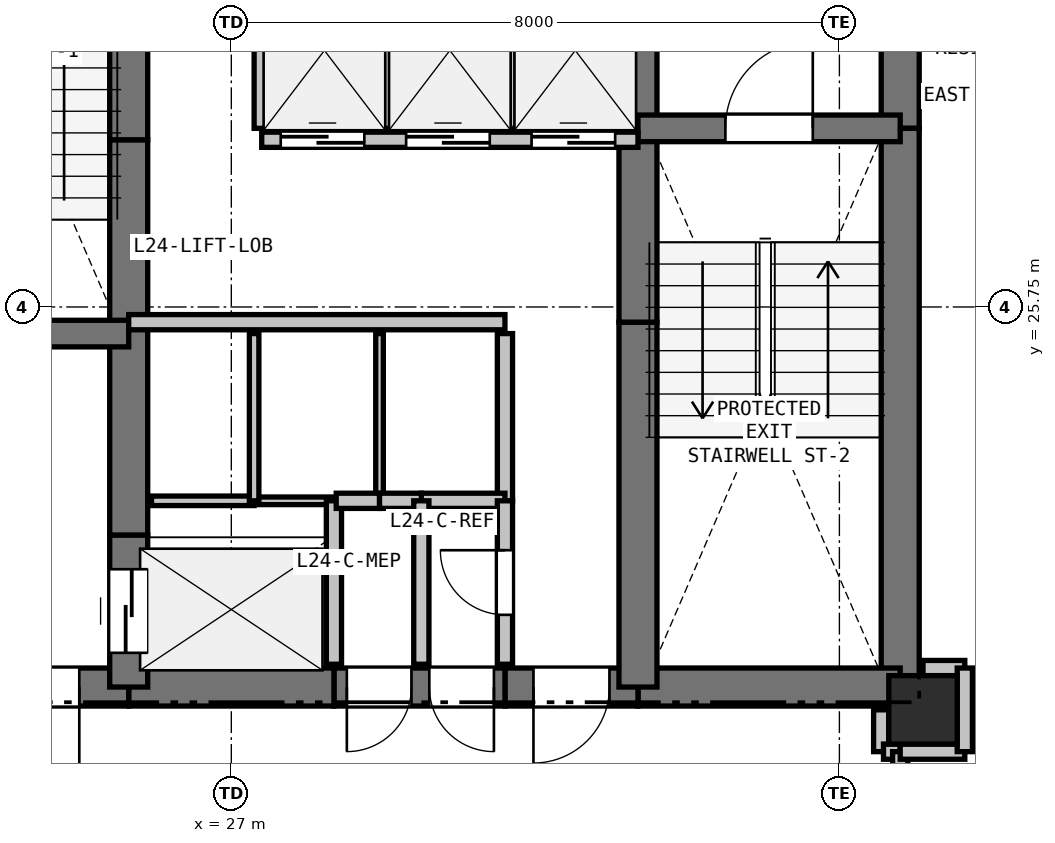
"""IFC4 building model, lengths in metres.
Left out: names, types, materials, properties, quantities, classifications, styles, units other than length and angle.
Written with IfcOpenShell. Run it as: python <this file> out.ifc"""

import sys

from ifc_helpers import new_model, si_unit, direction, frame, frame_2d, origin, origin_2d, place, context, subcontext, project, spatial, rectangle, extrude, element, fill, save


model = new_model("IFC4")
c1 = context("Model", 3, precision=1e-05, world=origin(), true_north=direction((0.0, 1.0)))
c2 = subcontext(c1, "Body", "Model", "MODEL_VIEW")
j1 = project(units=[si_unit("LENGTHUNIT", "METRE"), si_unit("PLANEANGLEUNIT", "RADIAN")], contexts=[c1])
p1 = place(None, origin())
s1 = spatial("IfcSite", under=j1, at=p1, CompositionType="ELEMENT")
p2 = place(p1, origin())
s2 = spatial("IfcBuilding", under=s1, at=p2, CompositionType="ELEMENT")
p3 = place(p2, frame((0.0, 0.0, 90.0)))
s3 = spatial("IfcBuildingStorey", under=s2, at=p3, CompositionType="ELEMENT", Elevation=90.0)
p4 = place(p3, frame((36.1, 20.45, 0.0), z_axis=(0.0, 0.0, 1.0), x_axis=(1.0, 0.0, 0.0)))
e1 = element("IfcColumn", 1, at=p4, inside=s3, PredefinedType="COLUMN", context=c2, shape_type="SweptSolid", body=[
    extrude(rectangle(XDim=0.9, YDim=0.9, at=origin_2d()), origin(), (0.0, 0.0, 1.0), 3.3),
])
p5 = place(p3, frame((35.8, 32.75, 0.0), z_axis=(0.0, 0.0, 1.0), x_axis=(0.0, -1.0, 0.0)))
e2 = element("IfcWall", 2, at=p5, inside=s3, PredefinedType="SHEAR", context=c2, shape_type="SweptSolid", body=[
    extrude(rectangle(XDim=4.65, YDim=0.5, at=frame_2d((2.325, 0.0))), origin(), (0.0, 0.0, 1.0), 3.05),
])
p6 = place(p3, frame((35.8, 28.1, 0.0), z_axis=(0.0, 0.0, 1.0), x_axis=(0.0, -1.0, 0.0)))
e3 = element("IfcWall", 3, at=p6, inside=s3, PredefinedType="SHEAR", context=c2, shape_type="SweptSolid", body=[
    extrude(rectangle(XDim=7.35, YDim=0.5, at=frame_2d((3.675, 0.0))), origin(), (0.0, 0.0, 1.0), 3.05),
])
p7 = place(p3, frame((35.8, 20.75, 0.0), z_axis=(0.0, 0.0, 1.0), x_axis=(-1.0, 0.0, 0.0)))
e4 = element("IfcWall", 4, at=p7, inside=s3, PredefinedType="SHEAR", context=c2, shape_type="SweptSolid", body=[
    extrude(rectangle(XDim=3.45, YDim=0.5, at=frame_2d((1.725, 0.0))), origin(), (0.0, 0.0, 1.0), 3.05),
])
p8 = place(p3, frame((32.35, 20.75, 0.0), z_axis=(0.0, 0.0, 1.0), x_axis=(-1.0, 0.0, 0.0)))
e5 = element("IfcWall", 5, at=p8, inside=s3, PredefinedType="SHEAR", context=c2, shape_type="SweptSolid", body=[
    extrude(rectangle(XDim=1.75, YDim=0.5, at=frame_2d((0.875, 0.0))), origin(), (0.0, 0.0, 1.0), 3.05),
])
p9 = place(p8, frame((0.375, 0.0, 0.0)))
e6 = element("IfcOpeningElement", 6, at=p9, cuts=e5, PredefinedType="OPENING", context=c2, shape_type="SweptSolid", body=[
    extrude(rectangle(XDim=1.0, YDim=2.15, at=frame_2d((0.5, 1.075))), frame((0.0, 0.26, 0.0), z_axis=(0.0, -1.0, 0.0), x_axis=(1.0, 0.0, 0.0)), (0.0, 0.0, 1.0), 0.52),
])
p10 = place(p3, frame((30.6, 20.75, 0.0), z_axis=(0.0, 0.0, 1.0), x_axis=(-1.0, 0.0, 0.0)))
e7 = element("IfcWall", 7, at=p10, inside=s3, PredefinedType="SHEAR", context=c2, shape_type="SweptSolid", body=[
    extrude(rectangle(XDim=2.25, YDim=0.5, at=frame_2d((1.125, 0.0))), origin(), (0.0, 0.0, 1.0), 3.05),
])
p11 = place(p10, frame((1.23, 0.0, 0.0)))
e8 = element("IfcOpeningElement", 8, at=p11, cuts=e7, PredefinedType="OPENING", context=c2, shape_type="SweptSolid", body=[
    extrude(rectangle(XDim=0.85, YDim=2.1, at=frame_2d((0.425, 1.05))), frame((0.0, 0.26, 0.0), z_axis=(0.0, -1.0, 0.0), x_axis=(1.0, 0.0, 0.0)), (0.0, 0.0, 1.0), 0.52),
])
p12 = place(p10, frame((0.145, 0.0, 0.0)))
e9 = element("IfcOpeningElement", 9, at=p12, cuts=e7, PredefinedType="OPENING", context=c2, shape_type="SweptSolid", body=[
    extrude(rectangle(XDim=0.85, YDim=2.1, at=frame_2d((0.425, 1.05))), frame((0.0, 0.26, 0.0), z_axis=(0.0, -1.0, 0.0), x_axis=(1.0, 0.0, 0.0)), (0.0, 0.0, 1.0), 0.52),
])
p13 = place(p3, frame((28.35, 20.75, 0.0), z_axis=(0.0, 0.0, 1.0), x_axis=(-1.0, 0.0, 0.0)))
e10 = element("IfcWall", 10, at=p13, inside=s3, PredefinedType="SHEAR", context=c2, shape_type="SweptSolid", body=[
    extrude(rectangle(XDim=2.7, YDim=0.5, at=frame_2d((1.35, 0.0))), origin(), (0.0, 0.0, 1.0), 3.05),
])
p14 = place(p3, frame((25.65, 20.75, 0.0), z_axis=(0.0, 0.0, 1.0), x_axis=(-1.0, 0.0, 0.0)))
e11 = element("IfcWall", 11, at=p14, inside=s3, PredefinedType="SHEAR", context=c2, shape_type="SweptSolid", body=[
    extrude(rectangle(XDim=3.45, YDim=0.5, at=frame_2d((1.725, 0.0))), origin(), (0.0, 0.0, 1.0), 3.05),
])
p15 = place(p14, frame((0.65, 0.0, 0.0)))
e12 = element("IfcOpeningElement", 12, at=p15, cuts=e11, PredefinedType="OPENING", context=c2, shape_type="SweptSolid", body=[
    extrude(rectangle(XDim=1.15, YDim=2.15, at=frame_2d((0.575, 1.075))), frame((0.0, 0.26, 0.0), z_axis=(0.0, -1.0, 0.0), x_axis=(1.0, 0.0, 0.0)), (0.0, 0.0, 1.0), 0.52),
])
p16 = place(p3, frame((25.65, 20.75, 0.0), z_axis=(0.0, 0.0, 1.0), x_axis=(0.0, 1.0, 0.0)))
e13 = element("IfcWall", 13, at=p16, inside=s3, PredefinedType="SHEAR", context=c2, shape_type="SweptSolid", body=[
    extrude(rectangle(XDim=2.0, YDim=0.5, at=frame_2d((1.0, 0.0))), origin(), (0.0, 0.0, 1.0), 3.05),
])
p17 = place(p16, frame((0.45, 0.0, 0.0)))
e14 = element("IfcOpeningElement", 14, at=p17, cuts=e13, PredefinedType="OPENING", context=c2, shape_type="SweptSolid", body=[
    extrude(rectangle(XDim=1.1, YDim=2.15, at=frame_2d((0.55, 1.075))), frame((0.0, 0.26, 0.0), z_axis=(0.0, -1.0, 0.0), x_axis=(1.0, 0.0, 0.0)), (0.0, 0.0, 1.0), 0.52),
])
p18 = place(p3, frame((25.65, 22.75, 0.0), z_axis=(0.0, 0.0, 1.0), x_axis=(0.0, 1.0, 0.0)))
e15 = element("IfcWall", 15, at=p18, inside=s3, PredefinedType="SHEAR", context=c2, shape_type="SweptSolid", body=[
    extrude(rectangle(XDim=2.8, YDim=0.5, at=frame_2d((1.4, 0.0))), origin(), (0.0, 0.0, 1.0), 3.05),
])
p19 = place(p3, frame((25.65, 25.55, 0.0), z_axis=(0.0, 0.0, 1.0), x_axis=(0.0, 1.0, 0.0)))
e16 = element("IfcWall", 16, at=p19, inside=s3, PredefinedType="SHEAR", context=c2, shape_type="SweptSolid", body=[
    extrude(rectangle(XDim=2.4, YDim=0.5, at=frame_2d((1.2, 0.0))), origin(), (0.0, 0.0, 1.0), 3.05),
])
for number, where, z_axis, x_axis in (
    (17, (25.65, 27.95, 0.0), (0.0, 0.0, 1.0), (0.0, 1.0, 0.0)),
    (18, (32.35, 20.75, 0.0), (0.0, 0.0, 1.0), (0.0, 1.0, 0.0)),
):
    element("IfcWall", number, at=place(p3, frame(where, z_axis=z_axis, x_axis=x_axis)), inside=s3, PredefinedType="SHEAR", context=c2, shape_type="SweptSolid", body=[
        extrude(rectangle(XDim=4.8, YDim=0.5, at=frame_2d((2.4, 0.0))), origin(), (0.0, 0.0, 1.0), 3.05),
    ])
p20 = place(p3, frame((32.35, 25.55, 0.0), z_axis=(0.0, 0.0, 1.0), x_axis=(0.0, 1.0, 0.0)))
e19 = element("IfcWall", 19, at=p20, inside=s3, PredefinedType="SHEAR", context=c2, shape_type="SweptSolid", body=[
    extrude(rectangle(XDim=2.4, YDim=0.5, at=frame_2d((1.2, 0.0))), origin(), (0.0, 0.0, 1.0), 3.05),
])
p21 = place(p3, frame((32.35, 27.95, 0.0), z_axis=(0.0, 0.0, 1.0), x_axis=(0.0, 1.0, 0.0)))
e20 = element("IfcWall", 20, at=p21, inside=s3, PredefinedType="SHEAR", context=c2, shape_type="SweptSolid", body=[
    extrude(rectangle(XDim=2.8, YDim=0.5, at=frame_2d((1.4, 0.0))), origin(), (0.0, 0.0, 1.0), 3.05),
])
p22 = place(p3, frame((22.2, 25.4, 0.0), z_axis=(0.0, 0.0, 1.0), x_axis=(1.0, 0.0, 0.0)))
e21 = element("IfcWall", 21, at=p22, inside=s3, PredefinedType="SHEAR", context=c2, shape_type="SweptSolid", body=[
    extrude(rectangle(XDim=3.45, YDim=0.35, at=frame_2d((1.725, 0.0))), origin(), (0.0, 0.0, 1.0), 3.05),
])
p23 = place(p22, frame((1.15, 0.0, 0.0)))
e22 = element("IfcOpeningElement", 22, at=p23, cuts=e21, PredefinedType="OPENING", context=c2, shape_type="SweptSolid", body=[
    extrude(rectangle(XDim=1.15, YDim=2.15, at=frame_2d((0.575, 1.075))), frame((0.0, 0.185, 0.0), z_axis=(0.0, -1.0, 0.0), x_axis=(1.0, 0.0, 0.0)), (0.0, 0.0, 1.0), 0.37),
])
p24 = place(p3, frame((32.35, 28.1, 0.0), z_axis=(0.0, 0.0, 1.0), x_axis=(1.0, 0.0, 0.0)))
e23 = element("IfcWall", 23, at=p24, inside=s3, PredefinedType="SHEAR", context=c2, shape_type="SweptSolid", body=[
    extrude(rectangle(XDim=3.45, YDim=0.35, at=frame_2d((1.725, 0.0))), origin(), (0.0, 0.0, 1.0), 3.05),
])
p25 = place(p24, frame((1.15, 0.0, 0.0)))
e24 = element("IfcOpeningElement", 24, at=p25, cuts=e23, PredefinedType="OPENING", context=c2, shape_type="SweptSolid", body=[
    extrude(rectangle(XDim=1.15, YDim=2.15, at=frame_2d((0.575, 1.075))), frame((0.0, 0.185, 0.0), z_axis=(0.0, -1.0, 0.0), x_axis=(1.0, 0.0, 0.0)), (0.0, 0.0, 1.0), 0.37),
])
p26 = place(p3, frame((25.65, 25.55, 0.0), z_axis=(0.0, 0.0, 1.0), x_axis=(1.0, 0.0, 0.0)))
e25 = element("IfcWall", 25, at=p26, inside=s3, PredefinedType="PARTITIONING", context=c2, shape_type="SweptSolid", body=[
    extrude(rectangle(XDim=4.95, YDim=0.2, at=frame_2d((2.475, 0.0))), origin(), (0.0, 0.0, 1.0), 3.05),
])
p27 = place(p3, frame((27.4, 27.95, 0.0), z_axis=(0.0, 0.0, 1.0), x_axis=(1.0, 0.0, 0.0)))
e26 = element("IfcWall", 26, at=p27, inside=s3, PredefinedType="PARTITIONING", context=c2, shape_type="SweptSolid", body=[
    extrude(rectangle(XDim=4.95, YDim=0.2, at=frame_2d((2.475, 0.0))), origin(), (0.0, 0.0, 1.0), 3.05),
])
p28 = place(p27, frame((0.25, 0.0, 0.0)))
e27 = element("IfcOpeningElement", 27, at=p28, cuts=e26, PredefinedType="OPENING", context=c2, shape_type="SweptSolid", body=[
    extrude(rectangle(XDim=1.1, YDim=2.15, at=frame_2d((0.55, 1.075))), frame((0.0, 0.11, 0.0), z_axis=(0.0, -1.0, 0.0), x_axis=(1.0, 0.0, 0.0)), (0.0, 0.0, 1.0), 0.22),
])
p29 = place(p27, frame((1.9, 0.0, 0.0)))
e28 = element("IfcOpeningElement", 28, at=p29, cuts=e26, PredefinedType="OPENING", context=c2, shape_type="SweptSolid", body=[
    extrude(rectangle(XDim=1.1, YDim=2.15, at=frame_2d((0.55, 1.075))), frame((0.0, 0.11, 0.0), z_axis=(0.0, -1.0, 0.0), x_axis=(1.0, 0.0, 0.0)), (0.0, 0.0, 1.0), 0.22),
])
p30 = place(p27, frame((3.55, 0.0, 0.0)))
e29 = element("IfcOpeningElement", 29, at=p30, cuts=e26, PredefinedType="OPENING", context=c2, shape_type="SweptSolid", body=[
    extrude(rectangle(XDim=1.1, YDim=2.15, at=frame_2d((0.55, 1.075))), frame((0.0, 0.11, 0.0), z_axis=(0.0, -1.0, 0.0), x_axis=(1.0, 0.0, 0.0)), (0.0, 0.0, 1.0), 0.22),
])
p31 = place(p3, frame((25.95, 23.2, 0.0), z_axis=(0.0, 0.0, 1.0), x_axis=(1.0, 0.0, 0.0)))
e30 = element("IfcWall", 30, at=p31, inside=s3, PredefinedType="PARTITIONING", context=c2, shape_type="SweptSolid", body=[
    extrude(rectangle(XDim=1.35, YDim=0.125, at=frame_2d((0.675, 0.0))), origin(), (0.0, 0.0, 1.0), 3.05),
])
p32 = place(p3, frame((27.3, 23.2, 0.0), z_axis=(0.0, 0.0, 1.0), x_axis=(1.0, 0.0, 0.0)))
e31 = element("IfcWall", 31, at=p32, inside=s3, PredefinedType="PARTITIONING", context=c2, shape_type="SweptSolid", body=[
    extrude(rectangle(XDim=1.05, YDim=0.1, at=frame_2d((0.525, 0.0))), origin(), (0.0, 0.0, 1.0), 3.05),
])
p33 = place(p3, frame((28.35, 23.2, 0.0), z_axis=(0.0, 0.0, 1.0), x_axis=(0.0, -1.0, 0.0)))
e32 = element("IfcWall", 32, at=p33, inside=s3, PredefinedType="PARTITIONING", context=c2, shape_type="SweptSolid", body=[
    extrude(rectangle(XDim=2.15, YDim=0.2, at=frame_2d((1.075, 0.0))), origin(), (0.0, 0.0, 1.0), 3.05),
])
p34 = place(p3, frame((27.3, 25.4, 0.0), z_axis=(0.0, 0.0, 1.0), x_axis=(0.0, -1.0, 0.0)))
e33 = element("IfcWall", 33, at=p34, inside=s3, PredefinedType="PARTITIONING", context=c2, shape_type="SweptSolid", body=[
    extrude(rectangle(XDim=2.2, YDim=0.125, at=frame_2d((1.1, 0.0))), origin(), (0.0, 0.0, 1.0), 3.05),
])
p35 = place(p3, frame((28.95, 25.4, 0.0), z_axis=(0.0, 0.0, 1.0), x_axis=(0.0, -1.0, 0.0)))
e34 = element("IfcWall", 34, at=p35, inside=s3, PredefinedType="PARTITIONING", context=c2, shape_type="SweptSolid", body=[
    extrude(rectangle(XDim=2.2, YDim=0.1, at=frame_2d((1.1, 0.0))), origin(), (0.0, 0.0, 1.0), 3.05),
])
p36 = place(p3, frame((28.95, 23.2, 0.0), z_axis=(0.0, 0.0, 1.0), x_axis=(-1.0, 0.0, 0.0)))
e35 = element("IfcWall", 35, at=p36, inside=s3, PredefinedType="PARTITIONING", context=c2, shape_type="SweptSolid", body=[
    extrude(rectangle(XDim=0.57, YDim=0.2, at=frame_2d((0.285, 0.0))), origin(), (0.0, 0.0, 1.0), 3.05),
])
p37 = place(p3, frame((30.6, 25.4, 0.0), z_axis=(0.0, 0.0, 1.0), x_axis=(0.0, -1.0, 0.0)))
e36 = element("IfcWall", 36, at=p37, inside=s3, PredefinedType="PARTITIONING", context=c2, shape_type="SweptSolid", body=[
    extrude(rectangle(XDim=2.2, YDim=0.2, at=frame_2d((1.1, 0.0))), origin(), (0.0, 0.0, 1.0), 3.05),
])
p38 = place(p3, frame((30.6, 23.2, 0.0), z_axis=(0.0, 0.0, 1.0), x_axis=(-1.0, 0.0, 0.0)))
e37 = element("IfcWall", 37, at=p38, inside=s3, PredefinedType="PARTITIONING", context=c2, shape_type="SweptSolid", body=[
    extrude(rectangle(XDim=1.1, YDim=0.2, at=frame_2d((0.55, 0.0))), origin(), (0.0, 0.0, 1.0), 3.05),
])
p39 = place(p3, frame((29.5, 23.2, 0.0), z_axis=(0.0, 0.0, 1.0), x_axis=(-1.0, 0.0, 0.0)))
e38 = element("IfcWall", 38, at=p39, inside=s3, PredefinedType="PARTITIONING", context=c2, shape_type="SweptSolid", body=[
    extrude(rectangle(XDim=0.55, YDim=0.2, at=frame_2d((0.275, 0.0))), origin(), (0.0, 0.0, 1.0), 3.05),
])
p40 = place(p3, frame((29.05, 30.3, 0.0), z_axis=(0.0, 0.0, 1.0), x_axis=(0.0, -1.0, 0.0)))
e39 = element("IfcWall", 39, at=p40, inside=s3, PredefinedType="PARTITIONING", context=c2, shape_type="SweptSolid", body=[
    extrude(rectangle(XDim=2.2, YDim=0.125, at=frame_2d((1.1, 0.0))), origin(), (0.0, 0.0, 1.0), 3.05),
])
p41 = place(p3, frame((27.4, 28.1, 0.0), z_axis=(0.0, 0.0, 1.0), x_axis=(0.0, 1.0, 0.0)))
e40 = element("IfcWall", 40, at=p41, inside=s3, PredefinedType="PARTITIONING", context=c2, shape_type="SweptSolid", body=[
    extrude(rectangle(XDim=2.2, YDim=0.2, at=frame_2d((1.1, 0.0))), origin(), (0.0, 0.0, 1.0), 3.05),
])
p42 = place(p3, frame((30.7, 30.3, 0.0), z_axis=(0.0, 0.0, 1.0), x_axis=(0.0, -1.0, 0.0)))
e41 = element("IfcWall", 41, at=p42, inside=s3, PredefinedType="PARTITIONING", context=c2, shape_type="SweptSolid", body=[
    extrude(rectangle(XDim=2.2, YDim=0.1, at=frame_2d((1.1, 0.0))), origin(), (0.0, 0.0, 1.0), 3.05),
])
p43 = place(p3, frame((30.6, 21.05, 0.0), z_axis=(0.0, 0.0, 1.0), x_axis=(0.0, 1.0, 0.0)))
e42 = element("IfcWall", 42, at=p43, inside=s3, PredefinedType="PARTITIONING", context=c2, shape_type="SweptSolid", body=[
    extrude(rectangle(XDim=2.15, YDim=0.2, at=frame_2d((1.075, 0.0))), origin(), (0.0, 0.0, 1.0), 3.05),
])
p44 = place(p43, frame((0.65, 0.0, 0.0)))
e43 = element("IfcOpeningElement", 43, at=p44, cuts=e42, PredefinedType="OPENING", context=c2, shape_type="SweptSolid", body=[
    extrude(rectangle(XDim=0.85, YDim=2.1, at=frame_2d((0.425, 1.05))), frame((0.0, 0.11, 0.0), z_axis=(0.0, -1.0, 0.0), x_axis=(1.0, 0.0, 0.0)), (0.0, 0.0, 1.0), 0.22),
])
p45 = place(p3, frame((35.55, 20.45, 0.0), z_axis=(0.0, 0.0, 1.0), x_axis=(0.0, -1.0, 0.0)))
e44 = element("IfcWall", 44, at=p45, inside=s3, PredefinedType="PARTITIONING", context=c2, shape_type="SweptSolid", body=[
    extrude(rectangle(XDim=0.55, YDim=0.2, at=frame_2d((0.275, 0.0))), origin(), (0.0, 0.0, 1.0), 2.498),
])
p46 = place(p3, frame((35.58, 19.9, 0.0), z_axis=(0.0, 0.0, 1.0), x_axis=(1.0, 0.0, 0.0)))
e45 = element("IfcWall", 45, at=p46, inside=s3, PredefinedType="PARTITIONING", context=c2, shape_type="SweptSolid", body=[
    extrude(rectangle(XDim=0.22, YDim=0.2, at=frame_2d((0.11, 0.0))), origin(), (0.0, 0.0, 1.0), 3.05),
])
p47 = place(p3, frame((35.8, 19.9, 0.0), z_axis=(0.0, 0.0, 1.0), x_axis=(0.0, -1.0, 0.0)))
e46 = element("IfcWall", 46, at=p47, inside=s3, PredefinedType="PARTITIONING", context=c2, shape_type="SweptSolid", body=[
    extrude(rectangle(XDim=1.75, YDim=0.2, at=frame_2d((0.875, 0.0))), origin(), (0.0, 0.0, 1.0), 3.05),
])
p48 = place(p47, frame((0.375, 0.0, 0.0)))
e47 = element("IfcOpeningElement", 47, at=p48, cuts=e46, PredefinedType="OPENING", context=c2, shape_type="SweptSolid", body=[
    extrude(rectangle(XDim=1.0, YDim=2.15, at=frame_2d((0.5, 1.075))), frame((0.0, 0.11, 0.0), z_axis=(0.0, -1.0, 0.0), x_axis=(1.0, 0.0, 0.0)), (0.0, 0.0, 1.0), 0.22),
])
p49 = place(p3, frame((36.65, 21.0, 0.0), z_axis=(0.0, 0.0, 1.0), x_axis=(-1.0, 0.0, 0.0)))
e48 = element("IfcWall", 48, at=p49, inside=s3, PredefinedType="PARTITIONING", context=c2, shape_type="SweptSolid", body=[
    extrude(rectangle(XDim=0.55, YDim=0.2, at=frame_2d((0.275, 0.0))), origin(), (0.0, 0.0, 1.0), 2.498),
])
p50 = place(p3, frame((35.8, 19.9, 0.0), z_axis=(0.0, 0.0, 1.0), x_axis=(1.0, 0.0, 0.0)))
e49 = element("IfcWall", 49, at=p50, inside=s3, PredefinedType="PARTITIONING", context=c2, shape_type="SweptSolid", body=[
    extrude(rectangle(XDim=0.85, YDim=0.2, at=frame_2d((0.425, 0.0))), origin(), (0.0, 0.0, 1.0), 2.423),
])
p51 = place(p3, frame((36.65, 19.9, 0.0), z_axis=(0.0, 0.0, 1.0), x_axis=(0.0, 1.0, 0.0)))
e50 = element("IfcWall", 50, at=p51, inside=s3, PredefinedType="PARTITIONING", context=c2, shape_type="SweptSolid", body=[
    extrude(rectangle(XDim=1.1, YDim=0.2, at=frame_2d((0.55, 0.0))), origin(), (0.0, 0.0, 1.0), 3.05),
])
p52 = place(p3, frame((29.5, 23.2, 0.0), z_axis=(0.0, 0.0, 1.0), x_axis=(0.0, -1.0, 0.0)))
e51 = element("IfcWall", 51, at=p52, inside=s3, PredefinedType="PARTITIONING", context=c2, shape_type="SweptSolid", body=[
    extrude(rectangle(XDim=2.15, YDim=0.2, at=frame_2d((1.075, 0.0))), origin(), (0.0, 0.0, 1.0), 3.05),
])
p53 = place(p28, origin())
e52 = element("IfcDoor", 52, at=p53, inside=s3, OperationType="SLIDING_TO_LEFT", PredefinedType="DOOR", context=c2, shape_type="SweptSolid", body=[
    extrude(rectangle(XDim=1.1, YDim=2.15, at=frame_2d((0.55, 1.075))), frame((0.0, 0.025, 0.0), z_axis=(0.0, -1.0, 0.0), x_axis=(1.0, 0.0, 0.0)), (0.0, 0.0, 1.0), 0.05),
])
fill(e27, e52)
p54 = place(p29, origin())
e53 = element("IfcDoor", 53, at=p54, inside=s3, OperationType="SLIDING_TO_LEFT", PredefinedType="DOOR", context=c2, shape_type="SweptSolid", body=[
    extrude(rectangle(XDim=1.1, YDim=2.15, at=frame_2d((0.55, 1.075))), frame((0.0, 0.025, 0.0), z_axis=(0.0, -1.0, 0.0), x_axis=(1.0, 0.0, 0.0)), (0.0, 0.0, 1.0), 0.05),
])
fill(e28, e53)
p55 = place(p30, origin())
e54 = element("IfcDoor", 54, at=p55, inside=s3, OperationType="SLIDING_TO_LEFT", PredefinedType="DOOR", context=c2, shape_type="SweptSolid", body=[
    extrude(rectangle(XDim=1.1, YDim=2.15, at=frame_2d((0.55, 1.075))), frame((0.0, 0.025, 0.0), z_axis=(0.0, -1.0, 0.0), x_axis=(1.0, 0.0, 0.0)), (0.0, 0.0, 1.0), 0.05),
])
fill(e29, e54)
p56 = place(p9, origin())
e55 = element("IfcDoor", 55, at=p56, inside=s3, OperationType="SINGLE_SWING_RIGHT", PredefinedType="DOOR", context=c2, shape_type="SweptSolid", body=[
    extrude(rectangle(XDim=1.0, YDim=2.15, at=frame_2d((0.5, 1.075))), frame((0.0, 0.025, 0.0), z_axis=(0.0, -1.0, 0.0), x_axis=(1.0, 0.0, 0.0)), (0.0, 0.0, 1.0), 0.05),
])
fill(e6, e55)
p57 = place(p17, origin())
e56 = element("IfcDoor", 56, at=p57, inside=s3, OperationType="SLIDING_TO_LEFT", PredefinedType="DOOR", context=c2, shape_type="SweptSolid", body=[
    extrude(rectangle(XDim=1.1, YDim=2.15, at=frame_2d((0.55, 1.075))), frame((0.0, 0.025, 0.0), z_axis=(0.0, -1.0, 0.0), x_axis=(1.0, 0.0, 0.0)), (0.0, 0.0, 1.0), 0.05),
])
fill(e14, e56)
p58 = place(p25, origin())
e57 = element("IfcDoor", 57, at=p58, inside=s3, OperationType="SINGLE_SWING_RIGHT", PredefinedType="DOOR", context=c2, shape_type="SweptSolid", body=[
    extrude(rectangle(XDim=1.15, YDim=2.15, at=frame_2d((0.575, 1.075))), frame((0.0, 0.025, 0.0), z_axis=(0.0, -1.0, 0.0), x_axis=(1.0, 0.0, 0.0)), (0.0, 0.0, 1.0), 0.05),
])
fill(e24, e57)
p59 = place(p15, origin())
e58 = element("IfcDoor", 58, at=p59, inside=s3, OperationType="SINGLE_SWING_LEFT", PredefinedType="DOOR", context=c2, shape_type="SweptSolid", body=[
    extrude(rectangle(XDim=1.15, YDim=2.15, at=frame_2d((0.575, 1.075))), frame((0.0, 0.025, 0.0), z_axis=(0.0, -1.0, 0.0), x_axis=(1.0, 0.0, 0.0)), (0.0, 0.0, 1.0), 0.05),
])
fill(e12, e58)
p60 = place(p44, origin())
e59 = element("IfcDoor", 59, at=p60, inside=s3, OperationType="SINGLE_SWING_RIGHT", PredefinedType="DOOR", context=c2, shape_type="SweptSolid", body=[
    extrude(rectangle(XDim=0.85, YDim=2.1, at=frame_2d((0.425, 1.05))), frame((0.0, 0.025, 0.0), z_axis=(0.0, -1.0, 0.0), x_axis=(1.0, 0.0, 0.0)), (0.0, 0.0, 1.0), 0.05),
])
fill(e43, e59)
p61 = place(p11, origin())
e60 = element("IfcDoor", 60, at=p61, inside=s3, OperationType="SINGLE_SWING_RIGHT", PredefinedType="DOOR", context=c2, shape_type="SweptSolid", body=[
    extrude(rectangle(XDim=0.85, YDim=2.1, at=frame_2d((0.425, 1.05))), frame((0.0, 0.025, 0.0), z_axis=(0.0, -1.0, 0.0), x_axis=(1.0, 0.0, 0.0)), (0.0, 0.0, 1.0), 0.05),
])
fill(e8, e60)
p62 = place(p12, origin())
e61 = element("IfcDoor", 61, at=p62, inside=s3, OperationType="SINGLE_SWING_LEFT", PredefinedType="DOOR", context=c2, shape_type="SweptSolid", body=[
    extrude(rectangle(XDim=0.85, YDim=2.1, at=frame_2d((0.425, 1.05))), frame((0.0, 0.025, 0.0), z_axis=(0.0, -1.0, 0.0), x_axis=(1.0, 0.0, 0.0)), (0.0, 0.0, 1.0), 0.05),
])
fill(e9, e61)
save(model, sys.argv[1])
